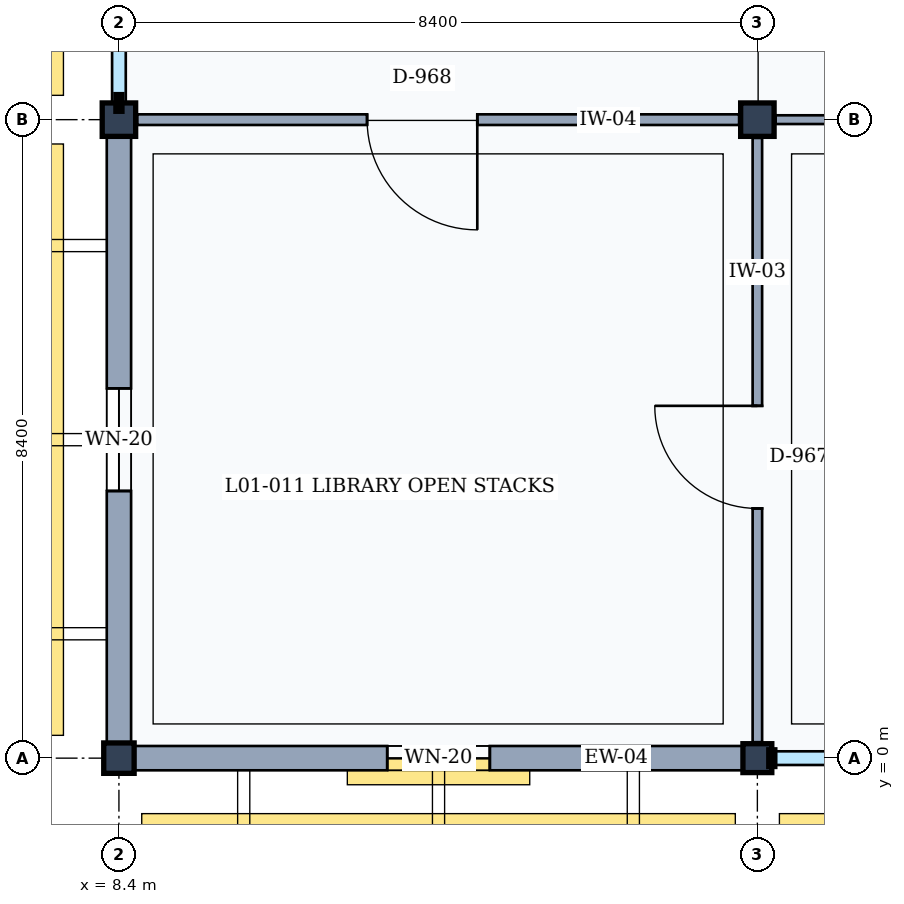
"""IFC4 building model, lengths in metres.
Left out: names, types, materials, properties, quantities, classifications, styles, units other than length and angle.
Written with IfcOpenShell. Run it as: python <this file> out.ifc"""

import sys

from ifc_helpers import new_model, si_unit, direction, frame, frame_2d, origin, origin_2d, place, context, subcontext, project, spatial, rectangle, extrude, element, fill, save


model = new_model("IFC4")
c1 = context("Model", 3, precision=1e-05, world=origin(), true_north=direction((0.0, 1.0)))
c2 = subcontext(c1, "Body", "Model", "MODEL_VIEW")
j1 = project(units=[si_unit("LENGTHUNIT", "METRE"), si_unit("PLANEANGLEUNIT", "RADIAN")], contexts=[c1])
p1 = place(None, origin())
s1 = spatial("IfcSite", under=j1, at=p1, CompositionType="ELEMENT")
p2 = place(p1, origin())
s2 = spatial("IfcBuilding", under=s1, at=p2, CompositionType="ELEMENT")
p3 = place(p2, frame((0.0, 0.0, 4.8)))
s3 = spatial("IfcBuildingStorey", under=s2, at=p3, CompositionType="ELEMENT", Elevation=4.8)
p4 = place(p3, frame((8.4, 0.0, 0.0), z_axis=(0.0, 0.0, 1.0), x_axis=(1.0, 0.0, 0.0)))
e1 = element("IfcColumn", 1, at=p4, inside=s3, PredefinedType="COLUMN", context=c2, shape_type="SweptSolid", body=[
    extrude(rectangle(XDim=0.4, YDim=0.4, at=origin_2d()), origin(), (0.0, 0.0, 1.0), 4.8),
])
p5 = place(p3, frame((8.4, 8.4, 0.0), z_axis=(0.0, 0.0, 1.0), x_axis=(1.0, 0.0, 0.0)))
e2 = element("IfcColumn", 2, at=p5, inside=s3, PredefinedType="COLUMN", context=c2, shape_type="SweptSolid", body=[
    extrude(rectangle(XDim=0.44, YDim=0.44, at=origin_2d()), origin(), (0.0, 0.0, 1.0), 4.8),
])
p6 = place(p3, frame((16.8, 0.0, 0.0), z_axis=(0.0, 0.0, 1.0), x_axis=(1.0, 0.0, 0.0)))
e3 = element("IfcColumn", 3, at=p6, inside=s3, PredefinedType="COLUMN", context=c2, shape_type="SweptSolid", body=[
    extrude(rectangle(XDim=0.38, YDim=0.38, at=origin_2d()), origin(), (0.0, 0.0, 1.0), 4.8),
])
p7 = place(p3, frame((16.8, 8.4, 0.0), z_axis=(0.0, 0.0, 1.0), x_axis=(1.0, 0.0, 0.0)))
e4 = element("IfcColumn", 4, at=p7, inside=s3, PredefinedType="COLUMN", context=c2, shape_type="SweptSolid", body=[
    extrude(rectangle(XDim=0.44, YDim=0.44, at=origin_2d()), origin(), (0.0, 0.0, 1.0), 4.8),
])
p8 = place(p3, frame((16.61, 0.0, 0.0), z_axis=(0.0, 0.0, 1.0), x_axis=(-1.0, 0.0, 0.0)))
e5 = element("IfcWall", 5, at=p8, inside=s3, PredefinedType="SOLIDWALL", context=c2, shape_type="SweptSolid", body=[
    extrude(rectangle(XDim=8.01, YDim=0.32, at=frame_2d((4.005, 0.0))), origin(), (0.0, 0.0, 1.0), 3.96),
])
p9 = place(p8, frame((3.33, 0.0, 0.9)))
e6 = element("IfcOpeningElement", 6, at=p9, cuts=e5, PredefinedType="OPENING", context=c2, shape_type="SweptSolid", body=[
    extrude(rectangle(XDim=1.35, YDim=1.6, at=frame_2d((0.675, 0.8))), frame((0.0, 0.17, 0.0), z_axis=(0.0, -1.0, 0.0), x_axis=(1.0, 0.0, 0.0)), (0.0, 0.0, 1.0), 0.34),
])
p10 = place(p3, frame((8.4, 0.2, 0.0), z_axis=(0.0, 0.0, 1.0), x_axis=(0.0, 1.0, 0.0)))
e7 = element("IfcWall", 7, at=p10, inside=s3, PredefinedType="SOLIDWALL", context=c2, shape_type="SweptSolid", body=[
    extrude(rectangle(XDim=7.98, YDim=0.32, at=frame_2d((3.99, 0.0))), origin(), (0.0, 0.0, 1.0), 3.96),
])
p11 = place(p10, frame((3.315, 0.0, 0.9)))
e8 = element("IfcOpeningElement", 8, at=p11, cuts=e7, PredefinedType="OPENING", context=c2, shape_type="SweptSolid", body=[
    extrude(rectangle(XDim=1.35, YDim=1.6, at=frame_2d((0.675, 0.8))), frame((0.0, 0.17, 0.0), z_axis=(0.0, -1.0, 0.0), x_axis=(1.0, 0.0, 0.0)), (0.0, 0.0, 1.0), 0.34),
])
p12 = place(p3, frame((16.8, 0.21, 0.0), z_axis=(0.0, 0.0, 1.0), x_axis=(0.0, 1.0, 0.0)))
e9 = element("IfcWall", 9, at=p12, inside=s3, PredefinedType="PARTITIONING", context=c2, shape_type="SweptSolid", body=[
    extrude(rectangle(XDim=7.95, YDim=0.125, at=frame_2d((3.975, 0.0))), origin(), (0.0, 0.0, 1.0), 3.92),
])
p13 = place(p12, frame((3.075, 0.0, 0.0)))
e10 = element("IfcOpeningElement", 10, at=p13, cuts=e9, PredefinedType="OPENING", context=c2, shape_type="SweptSolid", body=[
    extrude(rectangle(XDim=1.35, YDim=2.25, at=frame_2d((0.675, 1.125))), frame((0.0, 0.073, 0.0), z_axis=(0.0, -1.0, 0.0), x_axis=(1.0, 0.0, 0.0)), (0.0, 0.0, 1.0), 0.145),
])
p14 = place(p3, frame((8.64, 8.4, 0.0), z_axis=(0.0, 0.0, 1.0), x_axis=(1.0, 0.0, 0.0)))
e11 = element("IfcWall", 11, at=p14, inside=s3, PredefinedType="PARTITIONING", context=c2, shape_type="SweptSolid", body=[
    extrude(rectangle(XDim=7.92, YDim=0.14, at=frame_2d((3.96, 0.0))), origin(), (0.0, 0.0, 1.0), 3.92),
])
p15 = place(p14, frame((3.025, 0.0, 0.0)))
e12 = element("IfcOpeningElement", 12, at=p15, cuts=e11, PredefinedType="OPENING", context=c2, shape_type="SweptSolid", body=[
    extrude(rectangle(XDim=1.45, YDim=2.35, at=frame_2d((0.725, 1.175))), frame((0.0, 0.08, 0.0), z_axis=(0.0, -1.0, 0.0), x_axis=(1.0, 0.0, 0.0)), (0.0, 0.0, 1.0), 0.16),
])
p16 = place(p3, frame((17.04, 8.4, 0.0), z_axis=(0.0, 0.0, 1.0), x_axis=(1.0, 0.0, 0.0)))
e13 = element("IfcWall", 13, at=p16, inside=s3, PredefinedType="PARTITIONING", context=c2, shape_type="SweptSolid", body=[
    extrude(rectangle(XDim=7.92, YDim=0.115, at=frame_2d((3.96, 0.0))), origin(), (0.0, 0.0, 1.0), 3.92),
])
p17 = place(p9, origin())
e14 = element("IfcWindow", 14, at=p17, inside=s3, PartitioningType="SINGLE_PANEL", PredefinedType="WINDOW", context=c2, shape_type="SweptSolid", body=[
    extrude(rectangle(XDim=1.35, YDim=1.6, at=frame_2d((0.675, 0.8))), frame((0.0, 0.03, 0.0), z_axis=(0.0, -1.0, 0.0), x_axis=(1.0, 0.0, 0.0)), (0.0, 0.0, 1.0), 0.06),
])
fill(e6, e14)
p18 = place(p11, origin())
e15 = element("IfcWindow", 15, at=p18, inside=s3, PartitioningType="SINGLE_PANEL", PredefinedType="WINDOW", context=c2, shape_type="SweptSolid", body=[
    extrude(rectangle(XDim=1.35, YDim=1.6, at=frame_2d((0.675, 0.8))), frame((0.0, 0.03, 0.0), z_axis=(0.0, -1.0, 0.0), x_axis=(1.0, 0.0, 0.0)), (0.0, 0.0, 1.0), 0.06),
])
fill(e8, e15)
p19 = place(p13, origin())
e16 = element("IfcDoor", 16, at=p19, inside=s3, OperationType="SINGLE_SWING_RIGHT", PredefinedType="DOOR", context=c2, shape_type="SweptSolid", body=[
    extrude(rectangle(XDim=1.35, YDim=2.25, at=frame_2d((0.675, 1.125))), frame((0.0, 0.025, 0.0), z_axis=(0.0, -1.0, 0.0), x_axis=(1.0, 0.0, 0.0)), (0.0, 0.0, 1.0), 0.05),
])
fill(e10, e16)
p20 = place(p15, frame((1.45, 0.0, 0.0), z_axis=(0.0, 0.0, 1.0), x_axis=(-1.0, 0.0, 0.0)))
e17 = element("IfcDoor", 17, at=p20, inside=s3, OperationType="SINGLE_SWING_LEFT", PredefinedType="DOOR", context=c2, shape_type="SweptSolid", body=[
    extrude(rectangle(XDim=1.45, YDim=2.35, at=frame_2d((0.725, 1.175))), frame((0.0, 0.025, 0.0), z_axis=(0.0, -1.0, 0.0), x_axis=(1.0, 0.0, 0.0)), (0.0, 0.0, 1.0), 0.05),
])
fill(e12, e17)
save(model, sys.argv[1])
